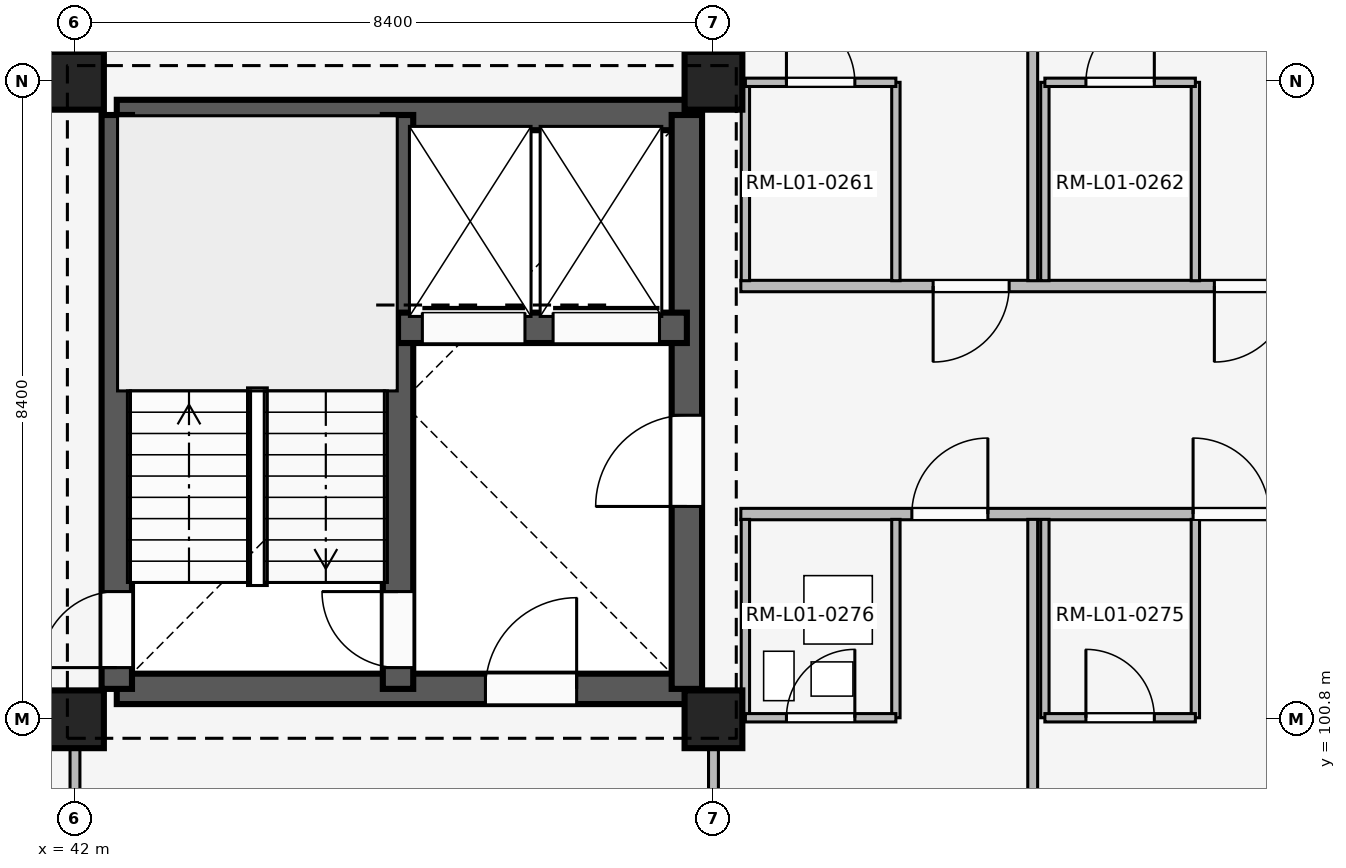
"""IFC4 building model, lengths in metres.
Left out: names, types, materials, properties, quantities, classifications, styles, units other than length and angle.
Written with IfcOpenShell. Run it as: python <this file> out.ifc"""

import sys

from ifc_helpers import new_model, si_unit, direction, frame, frame_2d, origin, origin_2d, place, context, subcontext, project, spatial, rectangle, extrude, element, fill, save


model = new_model("IFC4")
c1 = context("Model", 3, precision=1e-05, world=origin(), true_north=direction((0.0, 1.0)))
c2 = subcontext(c1, "Body", "Model", "MODEL_VIEW")
j1 = project(units=[si_unit("LENGTHUNIT", "METRE"), si_unit("PLANEANGLEUNIT", "RADIAN")], contexts=[c1])
p1 = place(None, origin())
s1 = spatial("IfcSite", under=j1, at=p1, CompositionType="ELEMENT")
p2 = place(p1, origin())
s2 = spatial("IfcBuilding", under=s1, at=p2, CompositionType="ELEMENT")
p3 = place(p2, frame((0.0, 0.0, 4.8)))
s3 = spatial("IfcBuildingStorey", under=s2, at=p3, CompositionType="ELEMENT", Elevation=4.8)
for number, where, z_axis, x_axis in (
    (1, (42.0, 100.8, 0.0), (0.0, 0.0, 1.0), (1.0, 0.0, 0.0)),
    (2, (42.0, 109.2, 0.0), (0.0, 0.0, 1.0), (1.0, 0.0, 0.0)),
    (3, (50.4, 100.8, 0.0), (0.0, 0.0, 1.0), (1.0, 0.0, 0.0)),
    (4, (50.4, 109.2, 0.0), (0.0, 0.0, 1.0), (1.0, 0.0, 0.0)),
):
    element("IfcColumn", number, at=place(p3, frame(where, z_axis=z_axis, x_axis=x_axis)), inside=s3, PredefinedType="COLUMN", context=c2, shape_type="SweptSolid", body=[
        extrude(rectangle(XDim=0.76, YDim=0.76, at=origin_2d()), origin(), (0.0, 0.0, 1.0), 3.3),
    ])
p4 = place(p3, frame((42.55, 101.2, 0.0), z_axis=(0.0, 0.0, 1.0), x_axis=(1.0, 0.0, 0.0)))
e5 = element("IfcWall", 5, at=p4, inside=s3, PredefinedType="SHEAR", context=c2, shape_type="SweptSolid", body=[
    extrude(rectangle(XDim=7.5, YDim=0.4, at=frame_2d((3.75, 0.0))), origin(), (0.0, 0.0, 1.0), 3.02),
])
p5 = place(p4, frame((4.85, 0.0, 0.0)))
e6 = element("IfcOpeningElement", 6, at=p5, cuts=e5, PredefinedType="OPENING", context=c2, shape_type="SweptSolid", body=[
    extrude(rectangle(XDim=1.2, YDim=2.1, at=frame_2d((0.6, 1.05))), frame((0.0, 0.21, 0.0), z_axis=(0.0, -1.0, 0.0), x_axis=(1.0, 0.0, 0.0)), (0.0, 0.0, 1.0), 0.42),
])
p6 = place(p3, frame((42.55, 108.75, 0.0), z_axis=(0.0, 0.0, 1.0), x_axis=(1.0, 0.0, 0.0)))
e7 = element("IfcWall", 7, at=p6, inside=s3, PredefinedType="SHEAR", context=c2, shape_type="SweptSolid", body=[
    extrude(rectangle(XDim=7.5, YDim=0.4, at=frame_2d((3.75, 0.0))), origin(), (0.0, 0.0, 1.0), 3.02),
])
p7 = place(p3, frame((42.55, 101.2, 0.0), z_axis=(0.0, 0.0, 1.0), x_axis=(0.0, 1.0, 0.0)))
e8 = element("IfcWall", 8, at=p7, inside=s3, PredefinedType="SHEAR", context=c2, shape_type="SweptSolid", body=[
    extrude(rectangle(XDim=7.55, YDim=0.4, at=frame_2d((3.775, 0.0))), origin(), (0.0, 0.0, 1.0), 3.02),
])
p8 = place(p7, frame((0.28, 0.0, 0.0)))
e9 = element("IfcOpeningElement", 9, at=p8, cuts=e8, PredefinedType="OPENING", context=c2, shape_type="SweptSolid", body=[
    extrude(rectangle(XDim=1.0, YDim=2.15, at=frame_2d((0.5, 1.075))), frame((0.0, 0.21, 0.0), z_axis=(0.0, -1.0, 0.0), x_axis=(1.0, 0.0, 0.0)), (0.0, 0.0, 1.0), 0.42),
])
p9 = place(p3, frame((50.05, 101.2, 0.0), z_axis=(0.0, 0.0, 1.0), x_axis=(0.0, 1.0, 0.0)))
e10 = element("IfcWall", 10, at=p9, inside=s3, PredefinedType="SHEAR", context=c2, shape_type="SweptSolid", body=[
    extrude(rectangle(XDim=7.55, YDim=0.4, at=frame_2d((3.775, 0.0))), origin(), (0.0, 0.0, 1.0), 3.02),
])
p10 = place(p9, frame((2.4, 0.0, 0.0)))
e11 = element("IfcOpeningElement", 11, at=p10, cuts=e10, PredefinedType="OPENING", context=c2, shape_type="SweptSolid", body=[
    extrude(rectangle(XDim=1.2, YDim=2.2, at=frame_2d((0.6, 1.1))), frame((0.0, 0.21, 0.0), z_axis=(0.0, -1.0, 0.0), x_axis=(1.0, 0.0, 0.0)), (0.0, 0.0, 1.0), 0.42),
])
p11 = place(p3, frame((46.25, 101.2, 0.0), z_axis=(0.0, 0.0, 1.0), x_axis=(0.0, 1.0, 0.0)))
e12 = element("IfcWall", 12, at=p11, inside=s3, PredefinedType="SHEAR", context=c2, shape_type="SweptSolid", body=[
    extrude(rectangle(XDim=7.55, YDim=0.4, at=frame_2d((3.775, 0.0))), origin(), (0.0, 0.0, 1.0), 3.02),
])
p12 = place(p11, frame((0.28, 0.0, 0.0)))
e13 = element("IfcOpeningElement", 13, at=p12, cuts=e12, PredefinedType="OPENING", context=c2, shape_type="SweptSolid", body=[
    extrude(rectangle(XDim=1.0, YDim=2.15, at=frame_2d((0.5, 1.075))), frame((0.0, 0.21, 0.0), z_axis=(0.0, -1.0, 0.0), x_axis=(1.0, 0.0, 0.0)), (0.0, 0.0, 1.0), 0.42),
])
p13 = place(p3, frame((46.25, 105.95, 0.0), z_axis=(0.0, 0.0, 1.0), x_axis=(1.0, 0.0, 0.0)))
e14 = element("IfcWall", 14, at=p13, inside=s3, PredefinedType="SHEAR", context=c2, shape_type="SweptSolid", body=[
    extrude(rectangle(XDim=3.8, YDim=0.4, at=frame_2d((1.9, 0.0))), origin(), (0.0, 0.0, 1.0), 3.02),
])
p14 = place(p13, frame((0.32, 0.0, 0.0)))
e15 = element("IfcOpeningElement", 15, at=p14, cuts=e14, PredefinedType="OPENING", context=c2, shape_type="SweptSolid", body=[
    extrude(rectangle(XDim=1.35, YDim=2.25, at=frame_2d((0.675, 1.125))), frame((0.0, 0.21, 0.0), z_axis=(0.0, -1.0, 0.0), x_axis=(1.0, 0.0, 0.0)), (0.0, 0.0, 1.0), 0.42),
])
p15 = place(p13, frame((2.04, 0.0, 0.0)))
e16 = element("IfcOpeningElement", 16, at=p15, cuts=e14, PredefinedType="OPENING", context=c2, shape_type="SweptSolid", body=[
    extrude(rectangle(XDim=1.4, YDim=2.25, at=frame_2d((0.7, 1.125))), frame((0.0, 0.21, 0.0), z_axis=(0.0, -1.0, 0.0), x_axis=(1.0, 0.0, 0.0)), (0.0, 0.0, 1.0), 0.42),
])
p16 = place(p3, frame((42.0, 92.54, 0.0), z_axis=(0.0, 0.0, 1.0), x_axis=(0.0, 1.0, 0.0)))
e17 = element("IfcWall", 17, at=p16, inside=s3, PredefinedType="PARTITIONING", context=c2, shape_type="SweptSolid", body=[
    extrude(rectangle(XDim=8.21, YDim=0.13, at=frame_2d((4.105, 0.0))), origin(), (0.0, 0.0, 1.0), 2.4),
])
p17 = place(p16, frame((3.64, 0.0, 0.0)))
e18 = element("IfcOpeningElement", 18, at=p17, cuts=e17, PredefinedType="OPENING", context=c2, shape_type="SweptSolid", body=[
    extrude(rectangle(XDim=1.08, YDim=2.15, at=frame_2d((0.54, 1.075))), frame((0.0, 0.075, 0.0), z_axis=(0.0, -1.0, 0.0), x_axis=(1.0, 0.0, 0.0)), (0.0, 0.0, 1.0), 0.15),
])
p18 = place(p3, frame((42.0, 109.55, 0.0), z_axis=(0.0, 0.0, 1.0), x_axis=(0.0, 1.0, 0.0)))
e19 = element("IfcWall", 19, at=p18, inside=s3, PredefinedType="PARTITIONING", context=c2, shape_type="SweptSolid", body=[
    extrude(rectangle(XDim=7.91, YDim=0.13, at=frame_2d((3.955, 0.0))), origin(), (0.0, 0.0, 1.0), 2.4),
])
p19 = place(p18, frame((3.4, 0.0, 0.0)))
e20 = element("IfcOpeningElement", 20, at=p19, cuts=e19, PredefinedType="OPENING", context=c2, shape_type="SweptSolid", body=[
    extrude(rectangle(XDim=1.05, YDim=2.2, at=frame_2d((0.525, 1.1))), frame((0.0, 0.075, 0.0), z_axis=(0.0, -1.0, 0.0), x_axis=(1.0, 0.0, 0.0)), (0.0, 0.0, 1.0), 0.15),
])
p20 = place(p3, frame((50.4, 92.54, 0.0), z_axis=(0.0, 0.0, 1.0), x_axis=(0.0, 1.0, 0.0)))
e21 = element("IfcWall", 21, at=p20, inside=s3, PredefinedType="PARTITIONING", context=c2, shape_type="SweptSolid", body=[
    extrude(rectangle(XDim=8.21, YDim=0.13, at=frame_2d((4.105, 0.0))), origin(), (0.0, 0.0, 1.0), 2.4),
])
p21 = place(p20, frame((3.64, 0.0, 0.0)))
e22 = element("IfcOpeningElement", 22, at=p21, cuts=e21, PredefinedType="OPENING", context=c2, shape_type="SweptSolid", body=[
    extrude(rectangle(XDim=1.08, YDim=2.15, at=frame_2d((0.54, 1.075))), frame((0.0, 0.075, 0.0), z_axis=(0.0, -1.0, 0.0), x_axis=(1.0, 0.0, 0.0)), (0.0, 0.0, 1.0), 0.15),
])
p22 = place(p3, frame((50.4, 109.55, 0.0), z_axis=(0.0, 0.0, 1.0), x_axis=(0.0, 1.0, 0.0)))
e23 = element("IfcWall", 23, at=p22, inside=s3, PredefinedType="PARTITIONING", context=c2, shape_type="SweptSolid", body=[
    extrude(rectangle(XDim=7.91, YDim=0.13, at=frame_2d((3.955, 0.0))), origin(), (0.0, 0.0, 1.0), 2.4),
])
p23 = place(p22, frame((3.4, 0.0, 0.0)))
e24 = element("IfcOpeningElement", 24, at=p23, cuts=e23, PredefinedType="OPENING", context=c2, shape_type="SweptSolid", body=[
    extrude(rectangle(XDim=1.05, YDim=2.2, at=frame_2d((0.525, 1.1))), frame((0.0, 0.075, 0.0), z_axis=(0.0, -1.0, 0.0), x_axis=(1.0, 0.0, 0.0)), (0.0, 0.0, 1.0), 0.15),
])
p24 = place(p3, frame((50.76, 103.5, 0.0), z_axis=(0.0, 0.0, 1.0), x_axis=(1.0, 0.0, 0.0)))
e25 = element("IfcWall", 25, at=p24, inside=s3, PredefinedType="PARTITIONING", context=c2, shape_type="SweptSolid", body=[
    extrude(rectangle(XDim=7.96, YDim=0.15, at=frame_2d((3.98, 0.0))), origin(), (0.0, 0.0, 1.0), 2.4),
])
p25 = place(p24, frame((2.25, 0.0, 0.0)))
e26 = element("IfcOpeningElement", 26, at=p25, cuts=e25, PredefinedType="OPENING", context=c2, shape_type="SweptSolid", body=[
    extrude(rectangle(XDim=1.0, YDim=2.15, at=frame_2d((0.5, 1.075))), frame((0.0, 0.085, 0.0), z_axis=(0.0, -1.0, 0.0), x_axis=(1.0, 0.0, 0.0)), (0.0, 0.0, 1.0), 0.17),
])
p26 = place(p24, frame((5.95, 0.0, 0.0)))
e27 = element("IfcOpeningElement", 27, at=p26, cuts=e25, PredefinedType="OPENING", context=c2, shape_type="SweptSolid", body=[
    extrude(rectangle(XDim=1.0, YDim=2.15, at=frame_2d((0.5, 1.075))), frame((0.0, 0.085, 0.0), z_axis=(0.0, -1.0, 0.0), x_axis=(1.0, 0.0, 0.0)), (0.0, 0.0, 1.0), 0.17),
])
p27 = place(p3, frame((54.6, 92.5, 0.0), z_axis=(0.0, 0.0, 1.0), x_axis=(0.0, 1.0, 0.0)))
e28 = element("IfcWall", 28, at=p27, inside=s3, PredefinedType="PARTITIONING", context=c2, shape_type="SweptSolid", body=[
    extrude(rectangle(XDim=10.93, YDim=0.13, at=frame_2d((5.465, 0.0))), origin(), (0.0, 0.0, 1.0), 2.4),
])
for number, where, z_axis, x_axis in (
    (29, (50.82, 100.82, 0.0), (0.0, 0.0, 1.0), (0.0, 1.0, 0.0)),
    (30, (52.8, 100.82, 0.0), (0.0, 0.0, 1.0), (0.0, 1.0, 0.0)),
):
    element("IfcWall", number, at=place(p3, frame(where, z_axis=z_axis, x_axis=x_axis)), inside=s3, PredefinedType="PARTITIONING", context=c2, shape_type="SweptSolid", body=[
        extrude(rectangle(XDim=2.61, YDim=0.11, at=frame_2d((1.305, 0.0))), origin(), (0.0, 0.0, 1.0), 2.4),
    ])
p28 = place(p3, frame((50.82, 100.82, 0.0), z_axis=(0.0, 0.0, 1.0), x_axis=(1.0, 0.0, 0.0)))
e31 = element("IfcWall", 31, at=p28, inside=s3, PredefinedType="PARTITIONING", context=c2, shape_type="SweptSolid", body=[
    extrude(rectangle(XDim=1.98, YDim=0.11, at=frame_2d((0.99, 0.0))), origin(), (0.0, 0.0, 1.0), 2.4),
])
p29 = place(p28, frame((0.54, 0.0, 0.0)))
e32 = element("IfcOpeningElement", 32, at=p29, cuts=e31, PredefinedType="OPENING", context=c2, shape_type="SweptSolid", body=[
    extrude(rectangle(XDim=0.9, YDim=2.1, at=frame_2d((0.45, 1.05))), frame((0.0, 0.065, 0.0), z_axis=(0.0, -1.0, 0.0), x_axis=(1.0, 0.0, 0.0)), (0.0, 0.0, 1.0), 0.13),
])
for number, where, z_axis, x_axis in (
    (33, (54.76, 100.82, 0.0), (0.0, 0.0, 1.0), (0.0, 1.0, 0.0)),
    (34, (56.74, 100.82, 0.0), (0.0, 0.0, 1.0), (0.0, 1.0, 0.0)),
):
    element("IfcWall", number, at=place(p3, frame(where, z_axis=z_axis, x_axis=x_axis)), inside=s3, PredefinedType="PARTITIONING", context=c2, shape_type="SweptSolid", body=[
        extrude(rectangle(XDim=2.61, YDim=0.11, at=frame_2d((1.305, 0.0))), origin(), (0.0, 0.0, 1.0), 2.4),
    ])
p30 = place(p3, frame((54.76, 100.82, 0.0), z_axis=(0.0, 0.0, 1.0), x_axis=(1.0, 0.0, 0.0)))
e35 = element("IfcWall", 35, at=p30, inside=s3, PredefinedType="PARTITIONING", context=c2, shape_type="SweptSolid", body=[
    extrude(rectangle(XDim=1.98, YDim=0.11, at=frame_2d((0.99, 0.0))), origin(), (0.0, 0.0, 1.0), 2.4),
])
p31 = place(p30, frame((0.54, 0.0, 0.0)))
e36 = element("IfcOpeningElement", 36, at=p31, cuts=e35, PredefinedType="OPENING", context=c2, shape_type="SweptSolid", body=[
    extrude(rectangle(XDim=0.9, YDim=2.1, at=frame_2d((0.45, 1.05))), frame((0.0, 0.065, 0.0), z_axis=(0.0, -1.0, 0.0), x_axis=(1.0, 0.0, 0.0)), (0.0, 0.0, 1.0), 0.13),
])
p32 = place(p3, frame((58.72, 106.5, 0.0), z_axis=(0.0, 0.0, 1.0), x_axis=(-1.0, 0.0, 0.0)))
e37 = element("IfcWall", 37, at=p32, inside=s3, PredefinedType="PARTITIONING", context=c2, shape_type="SweptSolid", body=[
    extrude(rectangle(XDim=7.96, YDim=0.15, at=frame_2d((3.98, 0.0))), origin(), (0.0, 0.0, 1.0), 2.4),
])
p33 = place(p32, frame((0.73, 0.0, 0.0)))
e38 = element("IfcOpeningElement", 38, at=p33, cuts=e37, PredefinedType="OPENING", context=c2, shape_type="SweptSolid", body=[
    extrude(rectangle(XDim=1.0, YDim=2.15, at=frame_2d((0.5, 1.075))), frame((0.0, 0.085, 0.0), z_axis=(0.0, -1.0, 0.0), x_axis=(1.0, 0.0, 0.0)), (0.0, 0.0, 1.0), 0.17),
])
p34 = place(p32, frame((4.43, 0.0, 0.0)))
e39 = element("IfcOpeningElement", 39, at=p34, cuts=e37, PredefinedType="OPENING", context=c2, shape_type="SweptSolid", body=[
    extrude(rectangle(XDim=1.0, YDim=2.15, at=frame_2d((0.5, 1.075))), frame((0.0, 0.085, 0.0), z_axis=(0.0, -1.0, 0.0), x_axis=(1.0, 0.0, 0.0)), (0.0, 0.0, 1.0), 0.17),
])
p35 = place(p3, frame((54.6, 106.57, 0.0), z_axis=(0.0, 0.0, 1.0), x_axis=(0.0, 1.0, 0.0)))
e40 = element("IfcWall", 40, at=p35, inside=s3, PredefinedType="PARTITIONING", context=c2, shape_type="SweptSolid", body=[
    extrude(rectangle(XDim=10.93, YDim=0.13, at=frame_2d((5.465, 0.0))), origin(), (0.0, 0.0, 1.0), 2.4),
])
for number, where, z_axis, x_axis in (
    (41, (50.82, 106.57, 0.0), (0.0, 0.0, 1.0), (0.0, 1.0, 0.0)),
    (42, (52.8, 106.57, 0.0), (0.0, 0.0, 1.0), (0.0, 1.0, 0.0)),
):
    element("IfcWall", number, at=place(p3, frame(where, z_axis=z_axis, x_axis=x_axis)), inside=s3, PredefinedType="PARTITIONING", context=c2, shape_type="SweptSolid", body=[
        extrude(rectangle(XDim=2.61, YDim=0.11, at=frame_2d((1.305, 0.0))), origin(), (0.0, 0.0, 1.0), 2.4),
    ])
p36 = place(p3, frame((50.82, 109.18, 0.0), z_axis=(0.0, 0.0, 1.0), x_axis=(1.0, 0.0, 0.0)))
e43 = element("IfcWall", 43, at=p36, inside=s3, PredefinedType="PARTITIONING", context=c2, shape_type="SweptSolid", body=[
    extrude(rectangle(XDim=1.98, YDim=0.11, at=frame_2d((0.99, 0.0))), origin(), (0.0, 0.0, 1.0), 2.4),
])
p37 = place(p36, frame((0.54, 0.0, 0.0)))
e44 = element("IfcOpeningElement", 44, at=p37, cuts=e43, PredefinedType="OPENING", context=c2, shape_type="SweptSolid", body=[
    extrude(rectangle(XDim=0.9, YDim=2.1, at=frame_2d((0.45, 1.05))), frame((0.0, 0.065, 0.0), z_axis=(0.0, -1.0, 0.0), x_axis=(1.0, 0.0, 0.0)), (0.0, 0.0, 1.0), 0.13),
])
for number, where, z_axis, x_axis in (
    (45, (54.76, 106.57, 0.0), (0.0, 0.0, 1.0), (0.0, 1.0, 0.0)),
    (46, (56.74, 106.57, 0.0), (0.0, 0.0, 1.0), (0.0, 1.0, 0.0)),
):
    element("IfcWall", number, at=place(p3, frame(where, z_axis=z_axis, x_axis=x_axis)), inside=s3, PredefinedType="PARTITIONING", context=c2, shape_type="SweptSolid", body=[
        extrude(rectangle(XDim=2.61, YDim=0.11, at=frame_2d((1.305, 0.0))), origin(), (0.0, 0.0, 1.0), 2.4),
    ])
p38 = place(p3, frame((54.76, 109.18, 0.0), z_axis=(0.0, 0.0, 1.0), x_axis=(1.0, 0.0, 0.0)))
e47 = element("IfcWall", 47, at=p38, inside=s3, PredefinedType="PARTITIONING", context=c2, shape_type="SweptSolid", body=[
    extrude(rectangle(XDim=1.98, YDim=0.11, at=frame_2d((0.99, 0.0))), origin(), (0.0, 0.0, 1.0), 2.4),
])
p39 = place(p38, frame((0.54, 0.0, 0.0)))
e48 = element("IfcOpeningElement", 48, at=p39, cuts=e47, PredefinedType="OPENING", context=c2, shape_type="SweptSolid", body=[
    extrude(rectangle(XDim=0.9, YDim=2.1, at=frame_2d((0.45, 1.05))), frame((0.0, 0.065, 0.0), z_axis=(0.0, -1.0, 0.0), x_axis=(1.0, 0.0, 0.0)), (0.0, 0.0, 1.0), 0.13),
])
p40 = place(p10, origin())
e49 = element("IfcDoor", 49, at=p40, inside=s3, OperationType="SINGLE_SWING_LEFT", PredefinedType="DOOR", context=c2, shape_type="SweptSolid", body=[
    extrude(rectangle(XDim=1.2, YDim=2.2, at=frame_2d((0.6, 1.1))), frame((0.0, 0.025, 0.0), z_axis=(0.0, -1.0, 0.0), x_axis=(1.0, 0.0, 0.0)), (0.0, 0.0, 1.0), 0.05),
])
fill(e11, e49)
p41 = place(p5, origin())
e50 = element("IfcDoor", 50, at=p41, inside=s3, OperationType="SINGLE_SWING_RIGHT", PredefinedType="DOOR", context=c2, shape_type="SweptSolid", body=[
    extrude(rectangle(XDim=1.2, YDim=2.1, at=frame_2d((0.6, 1.05))), frame((0.0, 0.025, 0.0), z_axis=(0.0, -1.0, 0.0), x_axis=(1.0, 0.0, 0.0)), (0.0, 0.0, 1.0), 0.05),
])
fill(e6, e50)
p42 = place(p8, origin())
e51 = element("IfcDoor", 51, at=p42, inside=s3, OperationType="SINGLE_SWING_LEFT", PredefinedType="DOOR", context=c2, shape_type="SweptSolid", body=[
    extrude(rectangle(XDim=1.0, YDim=2.15, at=frame_2d((0.5, 1.075))), frame((0.0, 0.025, 0.0), z_axis=(0.0, -1.0, 0.0), x_axis=(1.0, 0.0, 0.0)), (0.0, 0.0, 1.0), 0.05),
])
fill(e9, e51)
p43 = place(p12, origin())
e52 = element("IfcDoor", 52, at=p43, inside=s3, OperationType="SINGLE_SWING_RIGHT", PredefinedType="DOOR", context=c2, shape_type="SweptSolid", body=[
    extrude(rectangle(XDim=1.0, YDim=2.15, at=frame_2d((0.5, 1.075))), frame((0.0, 0.025, 0.0), z_axis=(0.0, -1.0, 0.0), x_axis=(1.0, 0.0, 0.0)), (0.0, 0.0, 1.0), 0.05),
])
fill(e13, e52)
p44 = place(p14, origin())
e53 = element("IfcDoor", 53, at=p44, inside=s3, OperationType="SLIDING_TO_LEFT", PredefinedType="DOOR", context=c2, shape_type="SweptSolid", body=[
    extrude(rectangle(XDim=1.35, YDim=2.25, at=frame_2d((0.675, 1.125))), frame((0.0, 0.025, 0.0), z_axis=(0.0, -1.0, 0.0), x_axis=(1.0, 0.0, 0.0)), (0.0, 0.0, 1.0), 0.05),
])
fill(e15, e53)
p45 = place(p15, origin())
e54 = element("IfcDoor", 54, at=p45, inside=s3, OperationType="SLIDING_TO_LEFT", PredefinedType="DOOR", context=c2, shape_type="SweptSolid", body=[
    extrude(rectangle(XDim=1.4, YDim=2.25, at=frame_2d((0.7, 1.125))), frame((0.0, 0.025, 0.0), z_axis=(0.0, -1.0, 0.0), x_axis=(1.0, 0.0, 0.0)), (0.0, 0.0, 1.0), 0.05),
])
fill(e16, e54)
p46 = place(p25, origin())
e55 = element("IfcDoor", 55, at=p46, inside=s3, OperationType="SINGLE_SWING_RIGHT", PredefinedType="DOOR", context=c2, shape_type="SweptSolid", body=[
    extrude(rectangle(XDim=1.0, YDim=2.15, at=frame_2d((0.5, 1.075))), frame((0.0, 0.025, 0.0), z_axis=(0.0, -1.0, 0.0), x_axis=(1.0, 0.0, 0.0)), (0.0, 0.0, 1.0), 0.05),
])
fill(e26, e55)
p47 = place(p26, origin())
e56 = element("IfcDoor", 56, at=p47, inside=s3, OperationType="SINGLE_SWING_LEFT", PredefinedType="DOOR", context=c2, shape_type="SweptSolid", body=[
    extrude(rectangle(XDim=1.0, YDim=2.15, at=frame_2d((0.5, 1.075))), frame((0.0, 0.025, 0.0), z_axis=(0.0, -1.0, 0.0), x_axis=(1.0, 0.0, 0.0)), (0.0, 0.0, 1.0), 0.05),
])
fill(e27, e56)
p48 = place(p29, origin())
e57 = element("IfcDoor", 57, at=p48, inside=s3, OperationType="SINGLE_SWING_RIGHT", PredefinedType="DOOR", context=c2, shape_type="SweptSolid", body=[
    extrude(rectangle(XDim=0.9, YDim=2.1, at=frame_2d((0.45, 1.05))), frame((0.0, 0.025, 0.0), z_axis=(0.0, -1.0, 0.0), x_axis=(1.0, 0.0, 0.0)), (0.0, 0.0, 1.0), 0.05),
])
fill(e32, e57)
p49 = place(p31, origin())
e58 = element("IfcDoor", 58, at=p49, inside=s3, OperationType="SINGLE_SWING_LEFT", PredefinedType="DOOR", context=c2, shape_type="SweptSolid", body=[
    extrude(rectangle(XDim=0.9, YDim=2.1, at=frame_2d((0.45, 1.05))), frame((0.0, 0.025, 0.0), z_axis=(0.0, -1.0, 0.0), x_axis=(1.0, 0.0, 0.0)), (0.0, 0.0, 1.0), 0.05),
])
fill(e36, e58)
p50 = place(p33, origin())
e59 = element("IfcDoor", 59, at=p50, inside=s3, OperationType="SINGLE_SWING_RIGHT", PredefinedType="DOOR", context=c2, shape_type="SweptSolid", body=[
    extrude(rectangle(XDim=1.0, YDim=2.15, at=frame_2d((0.5, 1.075))), frame((0.0, 0.025, 0.0), z_axis=(0.0, -1.0, 0.0), x_axis=(1.0, 0.0, 0.0)), (0.0, 0.0, 1.0), 0.05),
])
fill(e38, e59)
p51 = place(p34, origin())
e60 = element("IfcDoor", 60, at=p51, inside=s3, OperationType="SINGLE_SWING_RIGHT", PredefinedType="DOOR", context=c2, shape_type="SweptSolid", body=[
    extrude(rectangle(XDim=1.0, YDim=2.15, at=frame_2d((0.5, 1.075))), frame((0.0, 0.025, 0.0), z_axis=(0.0, -1.0, 0.0), x_axis=(1.0, 0.0, 0.0)), (0.0, 0.0, 1.0), 0.05),
])
fill(e39, e60)
p52 = place(p37, origin())
e61 = element("IfcDoor", 61, at=p52, inside=s3, OperationType="SINGLE_SWING_LEFT", PredefinedType="DOOR", context=c2, shape_type="SweptSolid", body=[
    extrude(rectangle(XDim=0.9, YDim=2.1, at=frame_2d((0.45, 1.05))), frame((0.0, 0.025, 0.0), z_axis=(0.0, -1.0, 0.0), x_axis=(1.0, 0.0, 0.0)), (0.0, 0.0, 1.0), 0.05),
])
fill(e44, e61)
p53 = place(p39, origin())
e62 = element("IfcDoor", 62, at=p53, inside=s3, OperationType="SINGLE_SWING_RIGHT", PredefinedType="DOOR", context=c2, shape_type="SweptSolid", body=[
    extrude(rectangle(XDim=0.9, YDim=2.1, at=frame_2d((0.45, 1.05))), frame((0.0, 0.025, 0.0), z_axis=(0.0, -1.0, 0.0), x_axis=(1.0, 0.0, 0.0)), (0.0, 0.0, 1.0), 0.05),
])
fill(e48, e62)
save(model, sys.argv[1])
